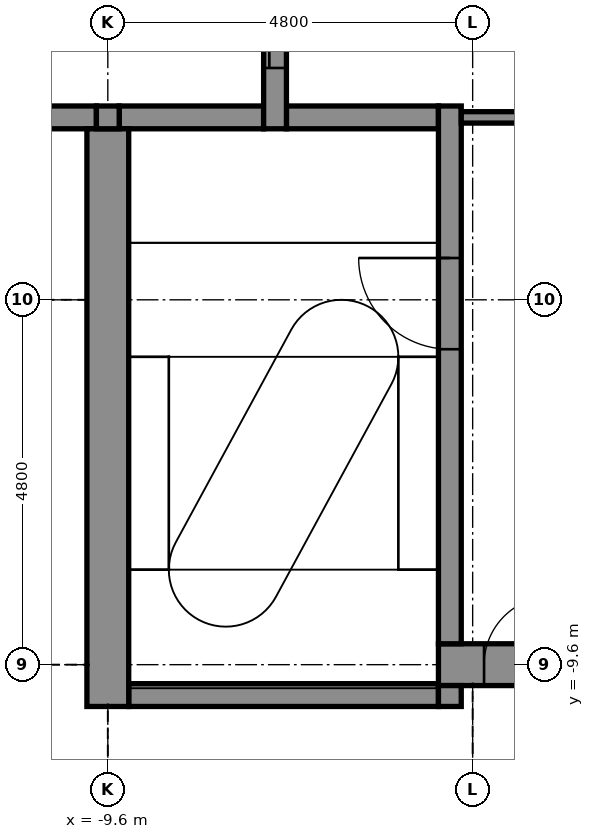
"""IFC4 building model, lengths in metres.
Left out: names, types, materials, properties, quantities, classifications, styles, units other than length and angle.
Written with IfcOpenShell. Run it as: python <this file> out.ifc"""

import sys

from ifc_helpers import new_model, si_unit, direction, frame, frame_2d, origin, place, context, subcontext, project, spatial, rectangle, extrude, element, fill, save


model = new_model("IFC4")
c1 = context("Model", 3, precision=1e-05, world=origin(), true_north=direction((0.0, 1.0)))
c2 = subcontext(c1, "Body", "Model", "MODEL_VIEW")
j1 = project(units=[si_unit("LENGTHUNIT", "METRE"), si_unit("PLANEANGLEUNIT", "RADIAN")], contexts=[c1])
p1 = place(None, origin())
s1 = spatial("IfcSite", under=j1, at=p1, CompositionType="ELEMENT")
p2 = place(p1, origin())
s2 = spatial("IfcBuilding", under=s1, at=p2, CompositionType="ELEMENT")
p3 = place(p2, frame((0.0, 0.0, 257.9)))
s3 = spatial("IfcBuildingStorey", under=s2, at=p3, CompositionType="ELEMENT", Elevation=257.9)
p4 = place(p3, frame((-9.325, -10.0, -0.15), z_axis=(0.0, 0.0, 1.0), x_axis=(1.0, 0.0, 0.0)))
e1 = element("IfcWall", 1, at=p4, inside=s3, PredefinedType="STANDARD", context=c2, shape_type="SweptSolid", body=[
    extrude(rectangle(XDim=4.075, YDim=0.3, at=frame_2d((2.038, 0.0))), origin(), (0.0, 0.0, 1.0), 3.9),
])
p5 = place(p3, frame((-5.25, -9.6, -0.15), z_axis=(0.0, 0.0, 1.0), x_axis=(1.0, 0.0, 0.0)))
e2 = element("IfcWall", 2, at=p5, inside=s3, PredefinedType="SHEAR", context=c2, shape_type="SweptSolid", body=[
    extrude(rectangle(XDim=10.2, YDim=0.55, at=frame_2d((5.1, 0.0))), origin(), (0.0, 0.0, 1.0), 3.9),
])
p6 = place(p5, frame((0.6, 0.0, 0.15)))
e3 = element("IfcOpeningElement", 3, at=p6, cuts=e2, PredefinedType="OPENING", context=c2, shape_type="SweptSolid", body=[
    extrude(rectangle(XDim=0.9, YDim=2.1, at=frame_2d((0.45, 1.05))), frame((0.0, 0.285, 0.0), z_axis=(0.0, -1.0, 0.0), x_axis=(1.0, 0.0, 0.0)), (0.0, 0.0, 1.0), 0.57),
])
p7 = place(p3, frame((-10.85, -2.4, -0.15), z_axis=(0.0, 0.0, 1.0), x_axis=(1.0, 0.0, 0.0)))
e4 = element("IfcWall", 4, at=p7, inside=s3, PredefinedType="STANDARD", context=c2, shape_type="SweptSolid", body=[
    extrude(rectangle(XDim=1.1, YDim=0.3, at=frame_2d((0.55, 0.0))), origin(), (0.0, 0.0, 1.0), 3.9),
])
p8 = place(p3, frame((-9.45, -2.4, -0.15), z_axis=(0.0, 0.0, 1.0), x_axis=(1.0, 0.0, 0.0)))
e5 = element("IfcWall", 5, at=p8, inside=s3, PredefinedType="STANDARD", context=c2, shape_type="SweptSolid", body=[
    extrude(rectangle(XDim=1.9, YDim=0.3, at=frame_2d((0.95, 0.0))), origin(), (0.0, 0.0, 1.0), 3.9),
])
p9 = place(p3, frame((-7.25, -2.4, -0.15), z_axis=(0.0, 0.0, 1.0), x_axis=(1.0, 0.0, 0.0)))
e6 = element("IfcWall", 6, at=p9, inside=s3, PredefinedType="STANDARD", context=c2, shape_type="SweptSolid", body=[
    extrude(rectangle(XDim=2.0, YDim=0.3, at=frame_2d((1.0, 0.0))), origin(), (0.0, 0.0, 1.0), 3.9),
])
p10 = place(p3, frame((-9.6, -10.15, -0.15), z_axis=(0.0, 0.0, 1.0), x_axis=(0.0, 1.0, 0.0)))
e7 = element("IfcWall", 7, at=p10, inside=s3, PredefinedType="SHEAR", context=c2, shape_type="SweptSolid", body=[
    extrude(rectangle(XDim=7.6, YDim=0.55, at=frame_2d((3.8, 0.0))), origin(), (0.0, 0.0, 1.0), 3.9),
])
p11 = place(p3, frame((-9.6, -2.55, -0.15), z_axis=(0.0, 0.0, 1.0), x_axis=(0.0, 1.0, 0.0)))
e8 = element("IfcWall", 8, at=p11, inside=s3, PredefinedType="STANDARD", context=c2, shape_type="SweptSolid", body=[
    extrude(rectangle(XDim=0.3, YDim=0.3, at=frame_2d((0.15, 0.0))), origin(), (0.0, 0.0, 1.0), 3.9),
])
p12 = place(p3, frame((-7.4, -2.55, -0.15), z_axis=(0.0, 0.0, 1.0), x_axis=(0.0, 1.0, 0.0)))
e9 = element("IfcWall", 9, at=p12, inside=s3, PredefinedType="STANDARD", context=c2, shape_type="SweptSolid", body=[
    extrude(rectangle(XDim=5.1, YDim=0.3, at=frame_2d((2.55, 0.0))), origin(), (0.0, 0.0, 1.0), 3.9),
])
p13 = place(p12, frame((0.8, 0.0, 0.15)))
e10 = element("IfcOpeningElement", 10, at=p13, cuts=e9, PredefinedType="OPENING", context=c2, shape_type="SweptSolid", body=[
    extrude(rectangle(XDim=1.1, YDim=2.1, at=frame_2d((0.55, 1.05))), frame((0.0, 0.16, 0.0), z_axis=(0.0, -1.0, 0.0), x_axis=(1.0, 0.0, 0.0)), (0.0, 0.0, 1.0), 0.32),
])
p14 = place(p12, frame((3.2, 0.0, 0.15)))
e11 = element("IfcOpeningElement", 11, at=p14, cuts=e9, PredefinedType="OPENING", context=c2, shape_type="SweptSolid", body=[
    extrude(rectangle(XDim=1.1, YDim=2.1, at=frame_2d((0.55, 1.05))), frame((0.0, 0.16, 0.0), z_axis=(0.0, -1.0, 0.0), x_axis=(1.0, 0.0, 0.0)), (0.0, 0.0, 1.0), 0.32),
])
p15 = place(p3, frame((-5.1, -10.15, -0.15), z_axis=(0.0, 0.0, 1.0), x_axis=(0.0, 1.0, 0.0)))
e12 = element("IfcWall", 12, at=p15, inside=s3, PredefinedType="STANDARD", context=c2, shape_type="SweptSolid", body=[
    extrude(rectangle(XDim=0.275, YDim=0.3, at=frame_2d((0.137, 0.0))), origin(), (0.0, 0.0, 1.0), 3.9),
])
p16 = place(p3, frame((-5.1, -9.325, -0.15), z_axis=(0.0, 0.0, 1.0), x_axis=(0.0, 1.0, 0.0)))
e13 = element("IfcWall", 13, at=p16, inside=s3, PredefinedType="STANDARD", context=c2, shape_type="SweptSolid", body=[
    extrude(rectangle(XDim=7.075, YDim=0.3, at=frame_2d((3.538, 0.0))), origin(), (0.0, 0.0, 1.0), 3.9),
])
p17 = place(p16, frame((3.875, 0.0, 0.15)))
e14 = element("IfcOpeningElement", 14, at=p17, cuts=e13, PredefinedType="OPENING", context=c2, shape_type="SweptSolid", body=[
    extrude(rectangle(XDim=1.2, YDim=2.1, at=frame_2d((0.6, 1.05))), frame((0.0, 0.16, 0.0), z_axis=(0.0, -1.0, 0.0), x_axis=(1.0, 0.0, 0.0)), (0.0, 0.0, 1.0), 0.32),
])
p18 = place(p3, frame((-4.95, -2.4, 0.0), z_axis=(0.0, 0.0, 1.0), x_axis=(1.0, 0.0, 0.0)))
e15 = element("IfcWall", 15, at=p18, inside=s3, PredefinedType="PARTITIONING", context=c2, shape_type="SweptSolid", body=[
    extrude(rectangle(XDim=1.2, YDim=0.15, at=frame_2d((0.6, 0.0))), origin(), (0.0, 0.0, 1.0), 3.75),
])
p19 = place(p13, origin())
e16 = element("IfcDoor", 16, at=p19, inside=s3, OperationType="DOUBLE_DOOR_SLIDING", PredefinedType="DOOR", context=c2, shape_type="SweptSolid", body=[
    extrude(rectangle(XDim=1.1, YDim=2.1, at=frame_2d((0.55, 1.05))), frame((0.0, 0.025, 0.0), z_axis=(0.0, -1.0, 0.0), x_axis=(1.0, 0.0, 0.0)), (0.0, 0.0, 1.0), 0.05),
])
fill(e10, e16)
p20 = place(p17, origin())
e17 = element("IfcDoor", 17, at=p20, inside=s3, OperationType="SINGLE_SWING_RIGHT", PredefinedType="DOOR", context=c2, shape_type="SweptSolid", body=[
    extrude(rectangle(XDim=1.2, YDim=2.1, at=frame_2d((0.6, 1.05))), frame((0.0, 0.025, 0.0), z_axis=(0.0, -1.0, 0.0), x_axis=(1.0, 0.0, 0.0)), (0.0, 0.0, 1.0), 0.05),
])
fill(e14, e17)
p21 = place(p6, origin())
e18 = element("IfcDoor", 18, at=p21, inside=s3, OperationType="SINGLE_SWING_RIGHT", PredefinedType="DOOR", context=c2, shape_type="SweptSolid", body=[
    extrude(rectangle(XDim=0.9, YDim=2.1, at=frame_2d((0.45, 1.05))), frame((0.0, 0.025, 0.0), z_axis=(0.0, -1.0, 0.0), x_axis=(1.0, 0.0, 0.0)), (0.0, 0.0, 1.0), 0.05),
])
fill(e3, e18)
save(model, sys.argv[1])
